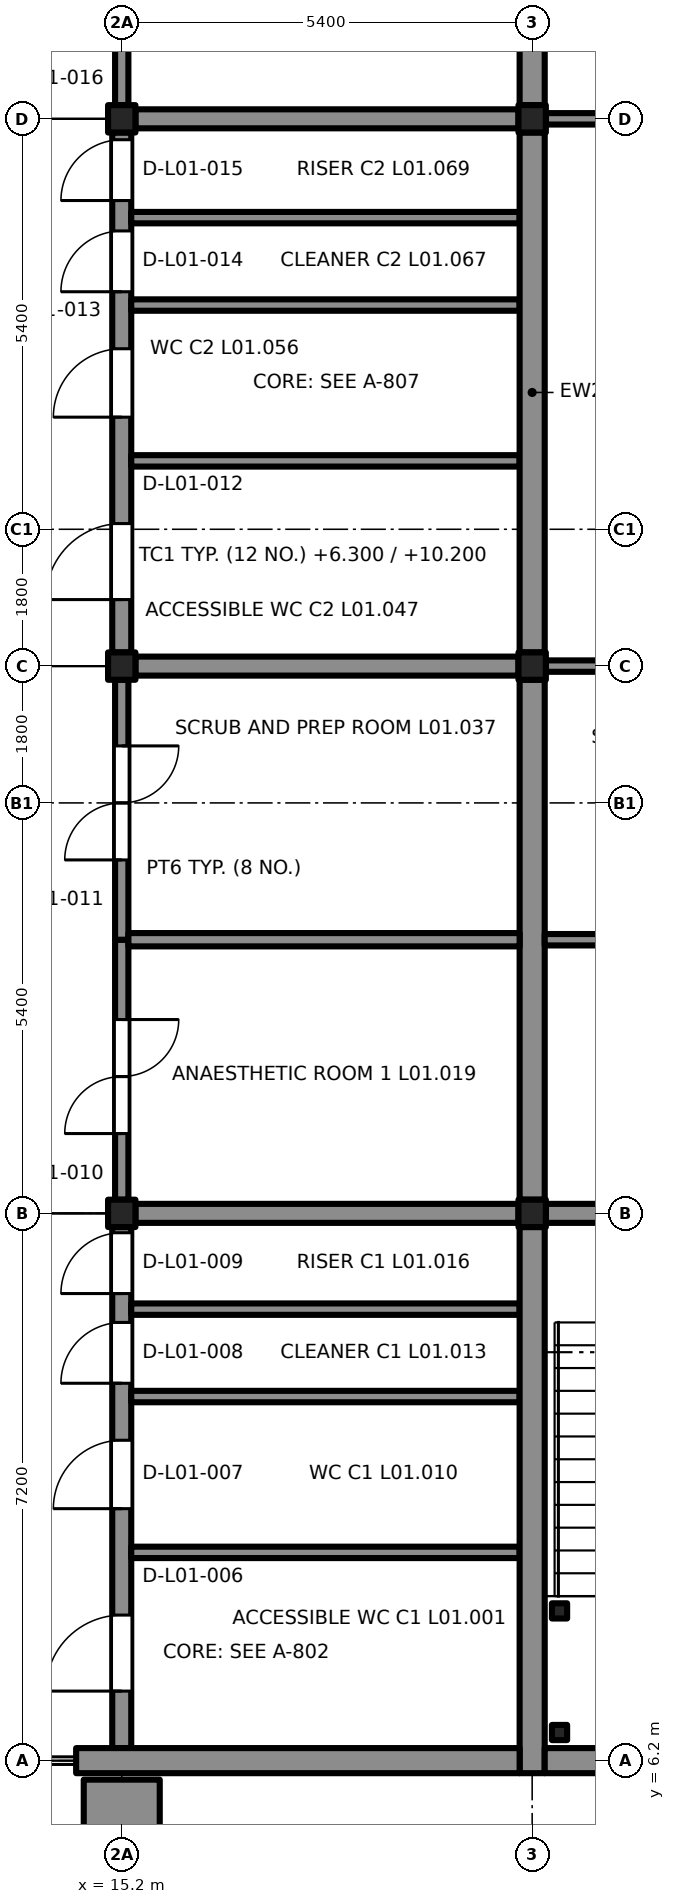
"""IFC4 building model, lengths in metres.
Left out: names, types, materials, properties, quantities, classifications, styles, units other than length and angle.
Written with IfcOpenShell. Run it as: python <this file> out.ifc"""

import sys

from ifc_helpers import new_model, si_unit, direction, frame, frame_2d, origin, origin_2d, place, context, subcontext, project, spatial, rectangle, extrude, element, fill, save


model = new_model("IFC4")
c1 = context("Model", 3, precision=1e-05, world=origin(), true_north=direction((0.0, 1.0)))
c2 = subcontext(c1, "Body", "Model", "MODEL_VIEW")
j1 = project(units=[si_unit("LENGTHUNIT", "METRE"), si_unit("PLANEANGLEUNIT", "RADIAN")], contexts=[c1])
p1 = place(None, origin())
s1 = spatial("IfcSite", under=j1, at=p1, CompositionType="ELEMENT")
p2 = place(p1, origin())
s2 = spatial("IfcBuilding", under=s1, at=p2, CompositionType="ELEMENT")
p3 = place(p2, frame((0.0, 0.0, 6.3)))
s3 = spatial("IfcBuildingStorey", under=s2, at=p3, CompositionType="ELEMENT", Elevation=6.3)
for number, where, z_axis, x_axis in (
    (1, (15.2, 13.4, 0.0), (0.0, 0.0, 1.0), (1.0, 0.0, 0.0)),
    (2, (20.6, 13.4, 0.0), (0.0, 0.0, 1.0), (1.0, 0.0, 0.0)),
    (3, (15.2, 20.6, 0.0), (0.0, 0.0, 1.0), (1.0, 0.0, 0.0)),
    (4, (20.6, 20.6, 0.0), (0.0, 0.0, 1.0), (1.0, 0.0, 0.0)),
    (5, (15.2, 27.8, 0.0), (0.0, 0.0, 1.0), (1.0, 0.0, 0.0)),
    (6, (20.6, 27.8, 0.0), (0.0, 0.0, 1.0), (1.0, 0.0, 0.0)),
):
    element("IfcColumn", number, at=place(p3, frame(where, z_axis=z_axis, x_axis=x_axis)), inside=s3, PredefinedType="COLUMN", context=c2, shape_type="SweptSolid", body=[
        extrude(rectangle(XDim=0.36, YDim=0.36, at=origin_2d()), origin(), (0.0, 0.0, 1.0), 3.9),
    ])
p4 = place(p3, frame((15.2, 6.365, 0.0), z_axis=(0.0, 0.0, 1.0), x_axis=(0.0, 1.0, 0.0)))
e7 = element("IfcWall", 7, at=p4, inside=s3, PredefinedType="SHEAR", context=c2, shape_type="SweptSolid", body=[
    extrude(rectangle(XDim=6.855, YDim=0.25, at=frame_2d((3.427, 0.0))), origin(), (0.0, 0.0, 1.0), 3.65),
])
p5 = place(p4, frame((0.75, 0.0, 0.0)))
e8 = element("IfcOpeningElement", 8, at=p5, cuts=e7, PredefinedType="OPENING", context=c2, shape_type="SweptSolid", body=[
    extrude(rectangle(XDim=1.0, YDim=2.1, at=frame_2d((0.5, 1.05))), frame((0.0, 0.135, 0.0), z_axis=(0.0, -1.0, 0.0), x_axis=(1.0, 0.0, 0.0)), (0.0, 0.0, 1.0), 0.27),
])
p6 = place(p4, frame((3.15, 0.0, 0.0)))
e9 = element("IfcOpeningElement", 9, at=p6, cuts=e7, PredefinedType="OPENING", context=c2, shape_type="SweptSolid", body=[
    extrude(rectangle(XDim=0.9, YDim=2.1, at=frame_2d((0.45, 1.05))), frame((0.0, 0.135, 0.0), z_axis=(0.0, -1.0, 0.0), x_axis=(1.0, 0.0, 0.0)), (0.0, 0.0, 1.0), 0.27),
])
p7 = place(p4, frame((4.8, 0.0, 0.0)))
e10 = element("IfcOpeningElement", 10, at=p7, cuts=e7, PredefinedType="OPENING", context=c2, shape_type="SweptSolid", body=[
    extrude(rectangle(XDim=0.8, YDim=2.1, at=frame_2d((0.4, 1.05))), frame((0.0, 0.135, 0.0), z_axis=(0.0, -1.0, 0.0), x_axis=(1.0, 0.0, 0.0)), (0.0, 0.0, 1.0), 0.27),
])
p8 = place(p4, frame((5.98, 0.0, 0.0)))
e11 = element("IfcOpeningElement", 11, at=p8, cuts=e7, PredefinedType="OPENING", context=c2, shape_type="SweptSolid", body=[
    extrude(rectangle(XDim=0.8, YDim=2.1, at=frame_2d((0.4, 1.05))), frame((0.0, 0.135, 0.0), z_axis=(0.0, -1.0, 0.0), x_axis=(1.0, 0.0, 0.0)), (0.0, 0.0, 1.0), 0.27),
])
p9 = place(p3, frame((15.38, 13.4, 0.0), z_axis=(0.0, 0.0, 1.0), x_axis=(1.0, 0.0, 0.0)))
e12 = element("IfcWall", 12, at=p9, inside=s3, PredefinedType="SHEAR", context=c2, shape_type="SweptSolid", body=[
    extrude(rectangle(XDim=5.04, YDim=0.25, at=frame_2d((2.52, 0.0))), origin(), (0.0, 0.0, 1.0), 3.65),
])
for number, where, z_axis, x_axis in (
    (13, (15.325, 8.94, 0.0), (0.0, 0.0, 1.0), (1.0, 0.0, 0.0)),
    (14, (15.325, 10.99, 0.0), (0.0, 0.0, 1.0), (1.0, 0.0, 0.0)),
    (15, (15.325, 12.14, 0.0), (0.0, 0.0, 1.0), (1.0, 0.0, 0.0)),
):
    element("IfcWall", number, at=place(p3, frame(where, z_axis=z_axis, x_axis=x_axis)), inside=s3, PredefinedType="PARTITIONING", context=c2, shape_type="SweptSolid", body=[
        extrude(rectangle(XDim=5.11, YDim=0.15, at=frame_2d((2.555, 0.0))), origin(), (0.0, 0.0, 1.0), 3.65),
    ])
p10 = place(p3, frame((15.2, 20.78, 0.0), z_axis=(0.0, 0.0, 1.0), x_axis=(0.0, 1.0, 0.0)))
e16 = element("IfcWall", 16, at=p10, inside=s3, PredefinedType="SHEAR", context=c2, shape_type="SweptSolid", body=[
    extrude(rectangle(XDim=6.84, YDim=0.25, at=frame_2d((3.42, 0.0))), origin(), (0.0, 0.0, 1.0), 3.65),
])
p11 = place(p10, frame((0.695, 0.0, 0.0)))
e17 = element("IfcOpeningElement", 17, at=p11, cuts=e16, PredefinedType="OPENING", context=c2, shape_type="SweptSolid", body=[
    extrude(rectangle(XDim=1.0, YDim=2.1, at=frame_2d((0.5, 1.05))), frame((0.0, 0.135, 0.0), z_axis=(0.0, -1.0, 0.0), x_axis=(1.0, 0.0, 0.0)), (0.0, 0.0, 1.0), 0.27),
])
p12 = place(p10, frame((3.095, 0.0, 0.0)))
e18 = element("IfcOpeningElement", 18, at=p12, cuts=e16, PredefinedType="OPENING", context=c2, shape_type="SweptSolid", body=[
    extrude(rectangle(XDim=0.9, YDim=2.1, at=frame_2d((0.45, 1.05))), frame((0.0, 0.135, 0.0), z_axis=(0.0, -1.0, 0.0), x_axis=(1.0, 0.0, 0.0)), (0.0, 0.0, 1.0), 0.27),
])
p13 = place(p10, frame((4.745, 0.0, 0.0)))
e19 = element("IfcOpeningElement", 19, at=p13, cuts=e16, PredefinedType="OPENING", context=c2, shape_type="SweptSolid", body=[
    extrude(rectangle(XDim=0.8, YDim=2.1, at=frame_2d((0.4, 1.05))), frame((0.0, 0.135, 0.0), z_axis=(0.0, -1.0, 0.0), x_axis=(1.0, 0.0, 0.0)), (0.0, 0.0, 1.0), 0.27),
])
p14 = place(p10, frame((5.945, 0.0, 0.0)))
e20 = element("IfcOpeningElement", 20, at=p14, cuts=e16, PredefinedType="OPENING", context=c2, shape_type="SweptSolid", body=[
    extrude(rectangle(XDim=0.8, YDim=2.1, at=frame_2d((0.4, 1.05))), frame((0.0, 0.135, 0.0), z_axis=(0.0, -1.0, 0.0), x_axis=(1.0, 0.0, 0.0)), (0.0, 0.0, 1.0), 0.27),
])
for number, where, z_axis, x_axis in (
    (21, (15.38, 20.6, 0.0), (0.0, 0.0, 1.0), (1.0, 0.0, 0.0)),
    (22, (15.38, 27.8, 0.0), (0.0, 0.0, 1.0), (1.0, 0.0, 0.0)),
):
    element("IfcWall", number, at=place(p3, frame(where, z_axis=z_axis, x_axis=x_axis)), inside=s3, PredefinedType="SHEAR", context=c2, shape_type="SweptSolid", body=[
        extrude(rectangle(XDim=5.04, YDim=0.25, at=frame_2d((2.52, 0.0))), origin(), (0.0, 0.0, 1.0), 3.65),
    ])
for number, where, z_axis, x_axis in (
    (23, (15.325, 23.3, 0.0), (0.0, 0.0, 1.0), (1.0, 0.0, 0.0)),
    (24, (15.325, 25.35, 0.0), (0.0, 0.0, 1.0), (1.0, 0.0, 0.0)),
    (25, (15.325, 26.5, 0.0), (0.0, 0.0, 1.0), (1.0, 0.0, 0.0)),
):
    element("IfcWall", number, at=place(p3, frame(where, z_axis=z_axis, x_axis=x_axis)), inside=s3, PredefinedType="PARTITIONING", context=c2, shape_type="SweptSolid", body=[
        extrude(rectangle(XDim=5.11, YDim=0.15, at=frame_2d((2.555, 0.0))), origin(), (0.0, 0.0, 1.0), 3.65),
    ])
p15 = place(p3, frame((20.78, 13.4, 0.0), z_axis=(0.0, 0.0, 1.0), x_axis=(1.0, 0.0, 0.0)))
e26 = element("IfcWall", 26, at=p15, inside=s3, PredefinedType="SHEAR", context=c2, shape_type="SweptSolid", body=[
    extrude(rectangle(XDim=5.06, YDim=0.25, at=frame_2d((2.53, 0.0))), origin(), (0.0, 0.0, 1.0), 3.65),
])
for number, where, z_axis, x_axis in (
    (27, (20.96, 6.57, 0.0), (0.0, 0.0, 1.0), (1.0, 0.0, 0.0)),
    (28, (20.96, 8.17, 0.0), (0.0, 0.0, 1.0), (1.0, 0.0, 0.0)),
):
    element("IfcColumn", number, at=place(p3, frame(where, z_axis=z_axis, x_axis=x_axis)), inside=s3, PredefinedType="COLUMN", context=c2, shape_type="SweptSolid", body=[
        extrude(rectangle(XDim=0.2, YDim=0.2, at=origin_2d()), origin(), (0.0, 0.0, 1.0), 3.9),
    ])
p16 = place(p3, frame((20.6, 13.22, 0.0), z_axis=(0.0, 0.0, 1.0), x_axis=(0.0, -1.0, 0.0)))
e29 = element("IfcWall", 29, at=p16, inside=s3, PredefinedType="SOLIDWALL", context=c2, shape_type="SweptSolid", body=[
    extrude(rectangle(XDim=7.185, YDim=0.33, at=frame_2d((3.593, 0.0))), origin(), (0.0, 0.0, 1.0), 3.22),
])
p17 = place(p3, frame((20.6, 20.42, 0.0), z_axis=(0.0, 0.0, 1.0), x_axis=(0.0, -1.0, 0.0)))
e30 = element("IfcWall", 30, at=p17, inside=s3, PredefinedType="SOLIDWALL", context=c2, shape_type="SweptSolid", body=[
    extrude(rectangle(XDim=6.84, YDim=0.33, at=frame_2d((3.42, 0.0))), origin(), (0.0, 0.0, 1.0), 3.22),
])
for number, where, z_axis, x_axis in (
    (31, (20.6, 27.62, 0.0), (0.0, 0.0, 1.0), (0.0, -1.0, 0.0)),
    (32, (20.6, 34.82, 0.0), (0.0, 0.0, 1.0), (0.0, -1.0, 0.0)),
):
    element("IfcWall", number, at=place(p3, frame(where, z_axis=z_axis, x_axis=x_axis)), inside=s3, PredefinedType="SOLIDWALL", context=c2, shape_type="SweptSolid", body=[
        extrude(rectangle(XDim=6.84, YDim=0.33, at=frame_2d((3.42, 0.0))), origin(), (0.0, 0.0, 1.0), 3.22),
    ])
p18 = place(p3, frame((20.435, 6.2, 0.0), z_axis=(0.0, 0.0, 1.0), x_axis=(-1.0, 0.0, 0.0)))
e33 = element("IfcWall", 33, at=p18, inside=s3, PredefinedType="SOLIDWALL", context=c2, shape_type="SweptSolid", body=[
    extrude(rectangle(XDim=5.835, YDim=0.33, at=frame_2d((2.917, 0.0))), origin(), (0.0, 0.0, 1.0), 3.2),
])
p19 = place(p3, frame((15.7, 5.575, 0.0), z_axis=(0.0, 0.0, 1.0), x_axis=(-1.0, 0.0, 0.0)))
e34 = element("IfcWall", 34, at=p19, inside=s3, PredefinedType="SOLIDWALL", context=c2, shape_type="SweptSolid", body=[
    extrude(rectangle(XDim=1.0, YDim=0.75, at=frame_2d((0.5, 0.0))), origin(), (0.0, 0.0, 1.0), 3.9),
])
p20 = place(p3, frame((22.72, 6.2, 0.0), z_axis=(0.0, 0.0, 1.0), x_axis=(-1.0, 0.0, 0.0)))
e35 = element("IfcWall", 35, at=p20, inside=s3, PredefinedType="SOLIDWALL", context=c2, shape_type="SweptSolid", body=[
    extrude(rectangle(XDim=1.955, YDim=0.33, at=frame_2d((0.978, 0.0))), origin(), (0.0, 0.0, 1.0), 3.2),
])
p21 = place(p3, frame((15.2, 17.0, 0.0), z_axis=(0.0, 0.0, 1.0), x_axis=(0.0, -1.0, 0.0)))
e36 = element("IfcWall", 36, at=p21, inside=s3, PredefinedType="PARTITIONING", context=c2, shape_type="SweptSolid", body=[
    extrude(rectangle(XDim=3.42, YDim=0.175, at=frame_2d((1.71, 0.0))), origin(), (0.0, 0.0, 1.0), 3.22),
])
p22 = place(p21, frame((1.05, 0.0, 0.0)))
e37 = element("IfcOpeningElement", 37, at=p22, cuts=e36, PredefinedType="OPENING", context=c2, shape_type="SweptSolid", body=[
    extrude(rectangle(XDim=1.5, YDim=2.1, at=frame_2d((0.75, 1.05))), frame((0.0, 0.097, 0.0), z_axis=(0.0, -1.0, 0.0), x_axis=(1.0, 0.0, 0.0)), (0.0, 0.0, 1.0), 0.195),
])
p23 = place(p3, frame((15.2, 20.42, 0.0), z_axis=(0.0, 0.0, 1.0), x_axis=(0.0, -1.0, 0.0)))
e38 = element("IfcWall", 38, at=p23, inside=s3, PredefinedType="PARTITIONING", context=c2, shape_type="SweptSolid", body=[
    extrude(rectangle(XDim=3.42, YDim=0.175, at=frame_2d((1.71, 0.0))), origin(), (0.0, 0.0, 1.0), 3.22),
])
p24 = place(p23, frame((0.87, 0.0, 0.0)))
e39 = element("IfcOpeningElement", 39, at=p24, cuts=e38, PredefinedType="OPENING", context=c2, shape_type="SweptSolid", body=[
    extrude(rectangle(XDim=1.5, YDim=2.1, at=frame_2d((0.75, 1.05))), frame((0.0, 0.097, 0.0), z_axis=(0.0, -1.0, 0.0), x_axis=(1.0, 0.0, 0.0)), (0.0, 0.0, 1.0), 0.195),
])
p25 = place(p3, frame((20.435, 17.0, 0.0), z_axis=(0.0, 0.0, 1.0), x_axis=(-1.0, 0.0, 0.0)))
e40 = element("IfcWall", 40, at=p25, inside=s3, PredefinedType="PARTITIONING", context=c2, shape_type="SweptSolid", body=[
    extrude(rectangle(XDim=5.147, YDim=0.175, at=frame_2d((2.574, 0.0))), origin(), (0.0, 0.0, 1.0), 3.38),
])
p26 = place(p3, frame((15.2, 31.4, 0.0), z_axis=(0.0, 0.0, 1.0), x_axis=(0.0, -1.0, 0.0)))
e41 = element("IfcWall", 41, at=p26, inside=s3, PredefinedType="PARTITIONING", context=c2, shape_type="SweptSolid", body=[
    extrude(rectangle(XDim=3.42, YDim=0.175, at=frame_2d((1.71, 0.0))), origin(), (0.0, 0.0, 1.0), 3.22),
])
p27 = place(p26, frame((1.05, 0.0, 0.0)))
e42 = element("IfcOpeningElement", 42, at=p27, cuts=e41, PredefinedType="OPENING", context=c2, shape_type="SweptSolid", body=[
    extrude(rectangle(XDim=1.5, YDim=2.1, at=frame_2d((0.75, 1.05))), frame((0.0, 0.097, 0.0), z_axis=(0.0, -1.0, 0.0), x_axis=(1.0, 0.0, 0.0)), (0.0, 0.0, 1.0), 0.195),
])
p28 = place(p3, frame((20.765, 17.0, 0.0), z_axis=(0.0, 0.0, 1.0), x_axis=(1.0, 0.0, 0.0)))
e43 = element("IfcWall", 43, at=p28, inside=s3, PredefinedType="PARTITIONING", context=c2, shape_type="SweptSolid", body=[
    extrude(rectangle(XDim=5.16, YDim=0.15, at=frame_2d((2.58, 0.0))), origin(), (0.0, 0.0, 1.0), 3.38),
])
for number, where, z_axis, x_axis in (
    (44, (20.78, 20.6, 0.0), (0.0, 0.0, 1.0), (1.0, 0.0, 0.0)),
    (45, (20.78, 27.8, 0.0), (0.0, 0.0, 1.0), (1.0, 0.0, 0.0)),
):
    element("IfcWall", number, at=place(p3, frame(where, z_axis=z_axis, x_axis=x_axis)), inside=s3, PredefinedType="PARTITIONING", context=c2, shape_type="SweptSolid", body=[
        extrude(rectangle(XDim=5.06, YDim=0.15, at=frame_2d((2.53, 0.0))), origin(), (0.0, 0.0, 1.0), 3.38),
    ])
p29 = place(p5, origin())
e46 = element("IfcDoor", 46, at=p29, inside=s3, OperationType="SINGLE_SWING_LEFT", PredefinedType="DOOR", context=c2, shape_type="SweptSolid", body=[
    extrude(rectangle(XDim=1.0, YDim=2.1, at=frame_2d((0.5, 1.05))), frame((0.0, 0.025, 0.0), z_axis=(0.0, -1.0, 0.0), x_axis=(1.0, 0.0, 0.0)), (0.0, 0.0, 1.0), 0.05),
])
fill(e8, e46)
p30 = place(p6, origin())
e47 = element("IfcDoor", 47, at=p30, inside=s3, OperationType="SINGLE_SWING_LEFT", PredefinedType="DOOR", context=c2, shape_type="SweptSolid", body=[
    extrude(rectangle(XDim=0.9, YDim=2.1, at=frame_2d((0.45, 1.05))), frame((0.0, 0.025, 0.0), z_axis=(0.0, -1.0, 0.0), x_axis=(1.0, 0.0, 0.0)), (0.0, 0.0, 1.0), 0.05),
])
fill(e9, e47)
p31 = place(p7, origin())
e48 = element("IfcDoor", 48, at=p31, inside=s3, OperationType="SINGLE_SWING_LEFT", PredefinedType="DOOR", context=c2, shape_type="SweptSolid", body=[
    extrude(rectangle(XDim=0.8, YDim=2.1, at=frame_2d((0.4, 1.05))), frame((0.0, 0.025, 0.0), z_axis=(0.0, -1.0, 0.0), x_axis=(1.0, 0.0, 0.0)), (0.0, 0.0, 1.0), 0.05),
])
fill(e10, e48)
p32 = place(p8, origin())
e49 = element("IfcDoor", 49, at=p32, inside=s3, OperationType="SINGLE_SWING_LEFT", PredefinedType="DOOR", context=c2, shape_type="SweptSolid", body=[
    extrude(rectangle(XDim=0.8, YDim=2.1, at=frame_2d((0.4, 1.05))), frame((0.0, 0.025, 0.0), z_axis=(0.0, -1.0, 0.0), x_axis=(1.0, 0.0, 0.0)), (0.0, 0.0, 1.0), 0.05),
])
fill(e11, e49)
p33 = place(p11, origin())
e50 = element("IfcDoor", 50, at=p33, inside=s3, OperationType="SINGLE_SWING_LEFT", PredefinedType="DOOR", context=c2, shape_type="SweptSolid", body=[
    extrude(rectangle(XDim=1.0, YDim=2.1, at=frame_2d((0.5, 1.05))), frame((0.0, 0.025, 0.0), z_axis=(0.0, -1.0, 0.0), x_axis=(1.0, 0.0, 0.0)), (0.0, 0.0, 1.0), 0.05),
])
fill(e17, e50)
p34 = place(p12, origin())
e51 = element("IfcDoor", 51, at=p34, inside=s3, OperationType="SINGLE_SWING_LEFT", PredefinedType="DOOR", context=c2, shape_type="SweptSolid", body=[
    extrude(rectangle(XDim=0.9, YDim=2.1, at=frame_2d((0.45, 1.05))), frame((0.0, 0.025, 0.0), z_axis=(0.0, -1.0, 0.0), x_axis=(1.0, 0.0, 0.0)), (0.0, 0.0, 1.0), 0.05),
])
fill(e18, e51)
p35 = place(p13, origin())
e52 = element("IfcDoor", 52, at=p35, inside=s3, OperationType="SINGLE_SWING_LEFT", PredefinedType="DOOR", context=c2, shape_type="SweptSolid", body=[
    extrude(rectangle(XDim=0.8, YDim=2.1, at=frame_2d((0.4, 1.05))), frame((0.0, 0.025, 0.0), z_axis=(0.0, -1.0, 0.0), x_axis=(1.0, 0.0, 0.0)), (0.0, 0.0, 1.0), 0.05),
])
fill(e19, e52)
p36 = place(p14, origin())
e53 = element("IfcDoor", 53, at=p36, inside=s3, OperationType="SINGLE_SWING_LEFT", PredefinedType="DOOR", context=c2, shape_type="SweptSolid", body=[
    extrude(rectangle(XDim=0.8, YDim=2.1, at=frame_2d((0.4, 1.05))), frame((0.0, 0.025, 0.0), z_axis=(0.0, -1.0, 0.0), x_axis=(1.0, 0.0, 0.0)), (0.0, 0.0, 1.0), 0.05),
])
fill(e20, e53)
p37 = place(p22, origin())
e54 = element("IfcDoor", 54, at=p37, inside=s3, OperationType="DOUBLE_DOOR_SINGLE_SWING", PredefinedType="DOOR", context=c2, shape_type="SweptSolid", body=[
    extrude(rectangle(XDim=1.5, YDim=2.1, at=frame_2d((0.75, 1.05))), frame((0.0, 0.025, 0.0), z_axis=(0.0, -1.0, 0.0), x_axis=(1.0, 0.0, 0.0)), (0.0, 0.0, 1.0), 0.05),
])
fill(e37, e54)
p38 = place(p24, origin())
e55 = element("IfcDoor", 55, at=p38, inside=s3, OperationType="DOUBLE_DOOR_SINGLE_SWING", PredefinedType="DOOR", context=c2, shape_type="SweptSolid", body=[
    extrude(rectangle(XDim=1.5, YDim=2.1, at=frame_2d((0.75, 1.05))), frame((0.0, 0.025, 0.0), z_axis=(0.0, -1.0, 0.0), x_axis=(1.0, 0.0, 0.0)), (0.0, 0.0, 1.0), 0.05),
])
fill(e39, e55)
save(model, sys.argv[1])
